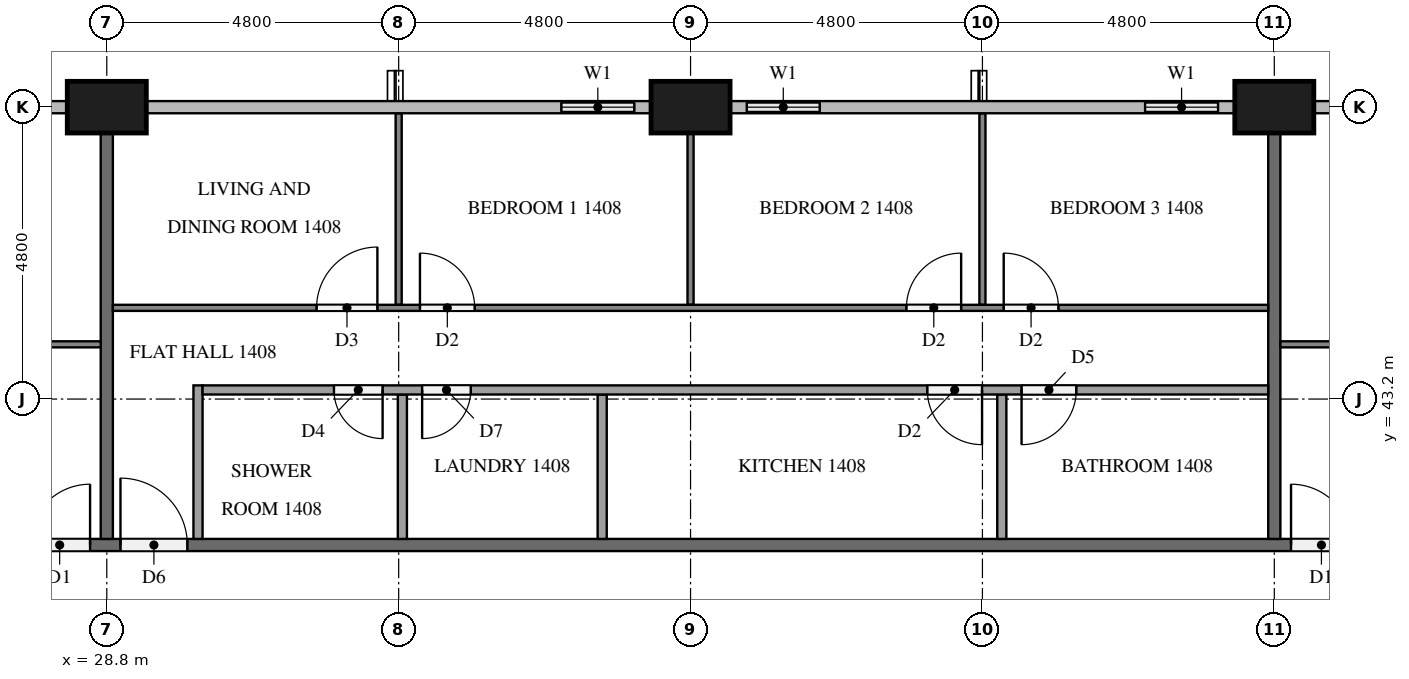
"""IFC4 building model, lengths in metres.
Left out: names, types, materials, properties, quantities, classifications, styles, units other than length and angle.
Written with IfcOpenShell. Run it as: python <this file> out.ifc"""

import sys

from ifc_helpers import new_model, si_unit, direction, frame, frame_2d, origin, origin_2d, place, context, subcontext, project, spatial, rectangle, extrude, element, fill, save


model = new_model("IFC4")
c1 = context("Model", 3, precision=1e-05, world=origin(), true_north=direction((0.0, 1.0)))
c2 = subcontext(c1, "Body", "Model", "MODEL_VIEW")
j1 = project(units=[si_unit("LENGTHUNIT", "METRE"), si_unit("PLANEANGLEUNIT", "RADIAN")], contexts=[c1])
p1 = place(None, origin())
s1 = spatial("IfcSite", under=j1, at=p1, CompositionType="ELEMENT")
p2 = place(p1, origin())
s2 = spatial("IfcBuilding", under=s1, at=p2, CompositionType="ELEMENT")
p3 = place(p2, frame((0.0, 0.0, 59.3)))
s3 = spatial("IfcBuildingStorey", under=s2, at=p3, CompositionType="ELEMENT", Elevation=59.3)
for number, where, z_axis, x_axis in (
    (1, (48.0, 48.0, 0.0), (0.0, 0.0, 1.0), (1.0, 0.0, 0.0)),
    (2, (38.4, 48.0, 0.0), (0.0, 0.0, 1.0), (1.0, 0.0, 0.0)),
    (3, (28.8, 48.0, 0.0), (0.0, 0.0, 1.0), (1.0, 0.0, 0.0)),
):
    element("IfcColumn", number, at=place(p3, frame(where, z_axis=z_axis, x_axis=x_axis)), inside=s3, PredefinedType="COLUMN", context=c2, shape_type="SweptSolid", body=[
        extrude(rectangle(XDim=1.3, YDim=0.85, at=origin_2d()), origin(), (0.0, 0.0, 1.0), 3.2),
    ])
p4 = place(p3, frame((50.4, 48.0, 0.0), z_axis=(0.0, 0.0, 1.0), x_axis=(-1.0, 0.0, 0.0)))
e4 = element("IfcWall", 4, at=p4, inside=s3, PredefinedType="SOLIDWALL", context=c2, shape_type="SweptSolid", body=[
    extrude(rectangle(XDim=1.75, YDim=0.15, at=frame_2d((0.875, 0.0))), origin(), (0.0, 0.0, 1.0), 3.2),
])
p5 = place(p4, frame((0.275, 0.0, 0.9)))
e5 = element("IfcOpeningElement", 5, at=p5, cuts=e4, PredefinedType="OPENING", context=c2, shape_type="SweptSolid", body=[
    extrude(rectangle(XDim=1.2, YDim=1.4, at=frame_2d((0.6, 0.7))), frame((0.0, 0.085, 0.0), z_axis=(0.0, -1.0, 0.0), x_axis=(1.0, 0.0, 0.0)), (0.0, 0.0, 1.0), 0.17),
])
p6 = place(p3, frame((47.35, 48.0, 0.0), z_axis=(0.0, 0.0, 1.0), x_axis=(-1.0, 0.0, 0.0)))
e6 = element("IfcWall", 6, at=p6, inside=s3, PredefinedType="SOLIDWALL", context=c2, shape_type="SweptSolid", body=[
    extrude(rectangle(XDim=1.75, YDim=0.15, at=frame_2d((0.875, 0.0))), origin(), (0.0, 0.0, 1.0), 3.2),
])
p7 = place(p6, frame((0.275, 0.0, 0.9)))
e7 = element("IfcOpeningElement", 7, at=p7, cuts=e6, PredefinedType="OPENING", context=c2, shape_type="SweptSolid", body=[
    extrude(rectangle(XDim=1.2, YDim=1.4, at=frame_2d((0.6, 0.7))), frame((0.0, 0.085, 0.0), z_axis=(0.0, -1.0, 0.0), x_axis=(1.0, 0.0, 0.0)), (0.0, 0.0, 1.0), 0.17),
])
p8 = place(p3, frame((40.8, 48.0, 0.0), z_axis=(0.0, 0.0, 1.0), x_axis=(-1.0, 0.0, 0.0)))
e8 = element("IfcWall", 8, at=p8, inside=s3, PredefinedType="SOLIDWALL", context=c2, shape_type="SweptSolid", body=[
    extrude(rectangle(XDim=1.75, YDim=0.15, at=frame_2d((0.875, 0.0))), origin(), (0.0, 0.0, 1.0), 3.2),
])
p9 = place(p8, frame((0.275, 0.0, 0.9)))
e9 = element("IfcOpeningElement", 9, at=p9, cuts=e8, PredefinedType="OPENING", context=c2, shape_type="SweptSolid", body=[
    extrude(rectangle(XDim=1.2, YDim=1.4, at=frame_2d((0.6, 0.7))), frame((0.0, 0.085, 0.0), z_axis=(0.0, -1.0, 0.0), x_axis=(1.0, 0.0, 0.0)), (0.0, 0.0, 1.0), 0.17),
])
p10 = place(p3, frame((37.75, 48.0, 0.0), z_axis=(0.0, 0.0, 1.0), x_axis=(-1.0, 0.0, 0.0)))
e10 = element("IfcWall", 10, at=p10, inside=s3, PredefinedType="SOLIDWALL", context=c2, shape_type="SweptSolid", body=[
    extrude(rectangle(XDim=1.75, YDim=0.15, at=frame_2d((0.875, 0.0))), origin(), (0.0, 0.0, 1.0), 3.2),
])
p11 = place(p10, frame((0.275, 0.0, 0.9)))
e11 = element("IfcOpeningElement", 11, at=p11, cuts=e10, PredefinedType="OPENING", context=c2, shape_type="SweptSolid", body=[
    extrude(rectangle(XDim=1.2, YDim=1.4, at=frame_2d((0.6, 0.7))), frame((0.0, 0.085, 0.0), z_axis=(0.0, -1.0, 0.0), x_axis=(1.0, 0.0, 0.0)), (0.0, 0.0, 1.0), 0.17),
])
p12 = place(p3, frame((28.15, 48.0, 0.0), z_axis=(0.0, 0.0, 1.0), x_axis=(-1.0, 0.0, 0.0)))
e12 = element("IfcWall", 12, at=p12, inside=s3, PredefinedType="SOLIDWALL", context=c2, shape_type="SweptSolid", body=[
    extrude(rectangle(XDim=1.75, YDim=0.15, at=frame_2d((0.875, 0.0))), origin(), (0.0, 0.0, 1.0), 3.2),
])
p13 = place(p12, frame((0.275, 0.0, 0.9)))
e13 = element("IfcOpeningElement", 13, at=p13, cuts=e12, PredefinedType="OPENING", context=c2, shape_type="SweptSolid", body=[
    extrude(rectangle(XDim=1.2, YDim=1.4, at=frame_2d((0.6, 0.7))), frame((0.0, 0.085, 0.0), z_axis=(0.0, -1.0, 0.0), x_axis=(1.0, 0.0, 0.0)), (0.0, 0.0, 1.0), 0.17),
])
p14 = place(p3, frame((11.9, 40.8, 0.0), z_axis=(0.0, 0.0, 1.0), x_axis=(1.0, 0.0, 0.0)))
e14 = element("IfcWall", 14, at=p14, inside=s3, PredefinedType="PARTITIONING", context=c2, shape_type="SweptSolid", body=[
    extrude(rectangle(XDim=38.6, YDim=0.2, at=frame_2d((19.3, 0.0))), origin(), (0.0, 0.0, 1.0), 3.2),
])
p15 = place(p14, frame((36.375, 0.0, 0.0)))
e15 = element("IfcOpeningElement", 15, at=p15, cuts=e14, PredefinedType="OPENING", context=c2, shape_type="SweptSolid", body=[
    extrude(rectangle(XDim=1.0, YDim=2.1, at=frame_2d((0.5, 1.05))), frame((0.0, 0.11, 0.0), z_axis=(0.0, -1.0, 0.0), x_axis=(1.0, 0.0, 0.0)), (0.0, 0.0, 1.0), 0.22),
])
p16 = place(p14, frame((17.125, 0.0, 0.0)))
e16 = element("IfcOpeningElement", 16, at=p16, cuts=e14, PredefinedType="OPENING", context=c2, shape_type="SweptSolid", body=[
    extrude(rectangle(XDim=1.1, YDim=2.1, at=frame_2d((0.55, 1.05))), frame((0.0, 0.11, 0.0), z_axis=(0.0, -1.0, 0.0), x_axis=(1.0, 0.0, 0.0)), (0.0, 0.0, 1.0), 0.22),
])
p17 = place(p14, frame((15.625, 0.0, 0.0)))
e17 = element("IfcOpeningElement", 17, at=p17, cuts=e14, PredefinedType="OPENING", context=c2, shape_type="SweptSolid", body=[
    extrude(rectangle(XDim=1.0, YDim=2.1, at=frame_2d((0.5, 1.05))), frame((0.0, 0.11, 0.0), z_axis=(0.0, -1.0, 0.0), x_axis=(1.0, 0.0, 0.0)), (0.0, 0.0, 1.0), 0.22),
])
p18 = place(p14, frame((1.225, 0.0, 0.0)))
e18 = element("IfcOpeningElement", 18, at=p18, cuts=e14, PredefinedType="OPENING", context=c2, shape_type="SweptSolid", body=[
    extrude(rectangle(XDim=1.0, YDim=2.1, at=frame_2d((0.5, 1.05))), frame((0.0, 0.11, 0.0), z_axis=(0.0, -1.0, 0.0), x_axis=(1.0, 0.0, 0.0)), (0.0, 0.0, 1.0), 0.22),
])
for number, where, z_axis, x_axis in (
    (19, (48.0, 47.575, 0.0), (0.0, 0.0, 1.0), (0.0, -1.0, 0.0)),
    (20, (28.8, 47.575, 0.0), (0.0, 0.0, 1.0), (0.0, -1.0, 0.0)),
):
    element("IfcWall", number, at=place(p3, frame(where, z_axis=z_axis, x_axis=x_axis)), inside=s3, PredefinedType="PARTITIONING", context=c2, shape_type="SweptSolid", body=[
        extrude(rectangle(XDim=6.675, YDim=0.2, at=frame_2d((3.337, 0.0))), origin(), (0.0, 0.0, 1.0), 3.2),
    ])
p19 = place(p3, frame((48.1, 44.1, 0.0), z_axis=(0.0, 0.0, 1.0), x_axis=(1.0, 0.0, 0.0)))
e21 = element("IfcWall", 21, at=p19, inside=s3, PredefinedType="PARTITIONING", context=c2, shape_type="SweptSolid", body=[
    extrude(rectangle(XDim=13.959, YDim=0.1, at=frame_2d((6.979, 0.0))), origin(), (0.0, 0.0, 1.0), 3.2),
])
p20 = place(p19, frame((3.45, 0.0, 0.0)))
e22 = element("IfcOpeningElement", 22, at=p20, cuts=e21, PredefinedType="OPENING", context=c2, shape_type="SweptSolid", body=[
    extrude(rectangle(XDim=0.9, YDim=2.1, at=frame_2d((0.45, 1.05))), frame((0.0, 0.06, 0.0), z_axis=(0.0, -1.0, 0.0), x_axis=(1.0, 0.0, 0.0)), (0.0, 0.0, 1.0), 0.12),
])
p21 = place(p19, frame((5.05, 0.0, 0.0)))
e23 = element("IfcOpeningElement", 23, at=p21, cuts=e21, PredefinedType="OPENING", context=c2, shape_type="SweptSolid", body=[
    extrude(rectangle(XDim=1.0, YDim=2.1, at=frame_2d((0.5, 1.05))), frame((0.0, 0.06, 0.0), z_axis=(0.0, -1.0, 0.0), x_axis=(1.0, 0.0, 0.0)), (0.0, 0.0, 1.0), 0.12),
])
p22 = place(p19, frame((12.759, 0.0, 0.0)))
e24 = element("IfcOpeningElement", 24, at=p22, cuts=e21, PredefinedType="OPENING", context=c2, shape_type="SweptSolid", body=[
    extrude(rectangle(XDim=0.9, YDim=2.1, at=frame_2d((0.45, 1.05))), frame((0.0, 0.06, 0.0), z_axis=(0.0, -1.0, 0.0), x_axis=(1.0, 0.0, 0.0)), (0.0, 0.0, 1.0), 0.12),
])
p23 = place(p3, frame((33.6, 44.75, 0.0), z_axis=(0.0, 0.0, 1.0), x_axis=(0.0, 1.0, 0.0)))
e25 = element("IfcWall", 25, at=p23, inside=s3, PredefinedType="PARTITIONING", context=c2, shape_type="SweptSolid", body=[
    extrude(rectangle(XDim=3.15, YDim=0.1, at=frame_2d((1.575, 0.0))), origin(), (0.0, 0.0, 1.0), 3.2),
])
p24 = place(p3, frame((38.4, 44.75, 0.0), z_axis=(0.0, 0.0, 1.0), x_axis=(0.0, 1.0, 0.0)))
e26 = element("IfcWall", 26, at=p24, inside=s3, PredefinedType="PARTITIONING", context=c2, shape_type="SweptSolid", body=[
    extrude(rectangle(XDim=2.825, YDim=0.1, at=frame_2d((1.413, 0.0))), origin(), (0.0, 0.0, 1.0), 3.2),
])
p25 = place(p3, frame((43.2, 44.75, 0.0), z_axis=(0.0, 0.0, 1.0), x_axis=(0.0, 1.0, 0.0)))
e27 = element("IfcWall", 27, at=p25, inside=s3, PredefinedType="PARTITIONING", context=c2, shape_type="SweptSolid", body=[
    extrude(rectangle(XDim=3.15, YDim=0.1, at=frame_2d((1.575, 0.0))), origin(), (0.0, 0.0, 1.0), 3.2),
])
p26 = place(p3, frame((28.9, 44.7, 0.0), z_axis=(0.0, 0.0, 1.0), x_axis=(1.0, 0.0, 0.0)))
e28 = element("IfcWall", 28, at=p26, inside=s3, PredefinedType="PARTITIONING", context=c2, shape_type="SweptSolid", body=[
    extrude(rectangle(XDim=19.0, YDim=0.1, at=frame_2d((9.5, 0.0))), origin(), (0.0, 0.0, 1.0), 3.2),
])
p27 = place(p26, frame((3.35, 0.0, 0.0)))
e29 = element("IfcOpeningElement", 29, at=p27, cuts=e28, PredefinedType="OPENING", context=c2, shape_type="SweptSolid", body=[
    extrude(rectangle(XDim=1.0, YDim=2.1, at=frame_2d((0.5, 1.05))), frame((0.0, 0.06, 0.0), z_axis=(0.0, -1.0, 0.0), x_axis=(1.0, 0.0, 0.0)), (0.0, 0.0, 1.0), 0.12),
])
p28 = place(p26, frame((5.05, 0.0, 0.0)))
e30 = element("IfcOpeningElement", 30, at=p28, cuts=e28, PredefinedType="OPENING", context=c2, shape_type="SweptSolid", body=[
    extrude(rectangle(XDim=0.9, YDim=2.1, at=frame_2d((0.45, 1.05))), frame((0.0, 0.06, 0.0), z_axis=(0.0, -1.0, 0.0), x_axis=(1.0, 0.0, 0.0)), (0.0, 0.0, 1.0), 0.12),
])
p29 = place(p26, frame((13.05, 0.0, 0.0)))
e31 = element("IfcOpeningElement", 31, at=p29, cuts=e28, PredefinedType="OPENING", context=c2, shape_type="SweptSolid", body=[
    extrude(rectangle(XDim=0.9, YDim=2.1, at=frame_2d((0.45, 1.05))), frame((0.0, 0.06, 0.0), z_axis=(0.0, -1.0, 0.0), x_axis=(1.0, 0.0, 0.0)), (0.0, 0.0, 1.0), 0.12),
])
p30 = place(p26, frame((14.65, 0.0, 0.0)))
e32 = element("IfcOpeningElement", 32, at=p30, cuts=e28, PredefinedType="OPENING", context=c2, shape_type="SweptSolid", body=[
    extrude(rectangle(XDim=0.9, YDim=2.1, at=frame_2d((0.45, 1.05))), frame((0.0, 0.06, 0.0), z_axis=(0.0, -1.0, 0.0), x_axis=(1.0, 0.0, 0.0)), (0.0, 0.0, 1.0), 0.12),
])
for number, where, z_axis, x_axis in (
    (33, (33.661, 40.9, 0.0), (0.0, 0.0, 1.0), (0.0, 1.0, 0.0)),
    (34, (36.947, 40.9, 0.0), (0.0, 0.0, 1.0), (0.0, 1.0, 0.0)),
    (35, (43.519, 40.9, 0.0), (0.0, 0.0, 1.0), (0.0, 1.0, 0.0)),
):
    element("IfcWall", number, at=place(p3, frame(where, z_axis=z_axis, x_axis=x_axis)), inside=s3, PredefinedType="PARTITIONING", context=c2, shape_type="SweptSolid", body=[
        extrude(rectangle(XDim=2.375, YDim=0.15, at=frame_2d((1.188, 0.0))), origin(), (0.0, 0.0, 1.0), 3.2),
    ])
p31 = place(p3, frame((30.3, 40.9, 0.0), z_axis=(0.0, 0.0, 1.0), x_axis=(0.0, 1.0, 0.0)))
e36 = element("IfcWall", 36, at=p31, inside=s3, PredefinedType="PARTITIONING", context=c2, shape_type="SweptSolid", body=[
    extrude(rectangle(XDim=2.525, YDim=0.15, at=frame_2d((1.263, 0.0))), origin(), (0.0, 0.0, 1.0), 3.2),
])
p32 = place(p3, frame((47.9, 43.35, 0.0), z_axis=(0.0, 0.0, 1.0), x_axis=(-1.0, 0.0, 0.0)))
e37 = element("IfcWall", 37, at=p32, inside=s3, PredefinedType="PARTITIONING", context=c2, shape_type="SweptSolid", body=[
    extrude(rectangle(XDim=17.525, YDim=0.15, at=frame_2d((8.762, 0.0))), origin(), (0.0, 0.0, 1.0), 3.2),
])
p33 = place(p32, frame((14.564, 0.0, 0.0)))
e38 = element("IfcOpeningElement", 38, at=p33, cuts=e37, PredefinedType="OPENING", context=c2, shape_type="SweptSolid", body=[
    extrude(rectangle(XDim=0.8, YDim=2.1, at=frame_2d((0.4, 1.05))), frame((0.0, 0.085, 0.0), z_axis=(0.0, -1.0, 0.0), x_axis=(1.0, 0.0, 0.0)), (0.0, 0.0, 1.0), 0.17),
])
p34 = place(p32, frame((13.114, 0.0, 0.0)))
e39 = element("IfcOpeningElement", 39, at=p34, cuts=e37, PredefinedType="OPENING", context=c2, shape_type="SweptSolid", body=[
    extrude(rectangle(XDim=0.8, YDim=2.1, at=frame_2d((0.4, 1.05))), frame((0.0, 0.085, 0.0), z_axis=(0.0, -1.0, 0.0), x_axis=(1.0, 0.0, 0.0)), (0.0, 0.0, 1.0), 0.17),
])
p35 = place(p32, frame((4.706, 0.0, 0.0)))
e40 = element("IfcOpeningElement", 40, at=p35, cuts=e37, PredefinedType="OPENING", context=c2, shape_type="SweptSolid", body=[
    extrude(rectangle(XDim=0.9, YDim=2.1, at=frame_2d((0.45, 1.05))), frame((0.0, 0.085, 0.0), z_axis=(0.0, -1.0, 0.0), x_axis=(1.0, 0.0, 0.0)), (0.0, 0.0, 1.0), 0.17),
])
p36 = place(p32, frame((3.156, 0.0, 0.0)))
e41 = element("IfcOpeningElement", 41, at=p36, cuts=e37, PredefinedType="OPENING", context=c2, shape_type="SweptSolid", body=[
    extrude(rectangle(XDim=0.9, YDim=2.1, at=frame_2d((0.45, 1.05))), frame((0.0, 0.085, 0.0), z_axis=(0.0, -1.0, 0.0), x_axis=(1.0, 0.0, 0.0)), (0.0, 0.0, 1.0), 0.17),
])
p37 = place(p3, frame((14.5, 44.1, 0.0), z_axis=(0.0, 0.0, 1.0), x_axis=(1.0, 0.0, 0.0)))
e42 = element("IfcWall", 42, at=p37, inside=s3, PredefinedType="PARTITIONING", context=c2, shape_type="SweptSolid", body=[
    extrude(rectangle(XDim=14.2, YDim=0.1, at=frame_2d((7.1, 0.0))), origin(), (0.0, 0.0, 1.0), 3.2),
])
p38 = place(p37, frame((9.85, 0.0, 0.0)))
e43 = element("IfcOpeningElement", 43, at=p38, cuts=e42, PredefinedType="OPENING", context=c2, shape_type="SweptSolid", body=[
    extrude(rectangle(XDim=0.9, YDim=2.1, at=frame_2d((0.45, 1.05))), frame((0.0, 0.06, 0.0), z_axis=(0.0, -1.0, 0.0), x_axis=(1.0, 0.0, 0.0)), (0.0, 0.0, 1.0), 0.12),
])
p39 = place(p37, frame((8.25, 0.0, 0.0)))
e44 = element("IfcOpeningElement", 44, at=p39, cuts=e42, PredefinedType="OPENING", context=c2, shape_type="SweptSolid", body=[
    extrude(rectangle(XDim=0.9, YDim=2.1, at=frame_2d((0.45, 1.05))), frame((0.0, 0.06, 0.0), z_axis=(0.0, -1.0, 0.0), x_axis=(1.0, 0.0, 0.0)), (0.0, 0.0, 1.0), 0.12),
])
p40 = place(p37, frame((0.3, 0.0, 0.0)))
e45 = element("IfcOpeningElement", 45, at=p40, cuts=e42, PredefinedType="OPENING", context=c2, shape_type="SweptSolid", body=[
    extrude(rectangle(XDim=1.0, YDim=2.1, at=frame_2d((0.5, 1.05))), frame((0.0, 0.06, 0.0), z_axis=(0.0, -1.0, 0.0), x_axis=(1.0, 0.0, 0.0)), (0.0, 0.0, 1.0), 0.12),
])
p41 = place(p7, origin())
e46 = element("IfcWindow", 46, at=p41, inside=s3, PartitioningType="SINGLE_PANEL", PredefinedType="WINDOW", context=c2, shape_type="SweptSolid", body=[
    extrude(rectangle(XDim=1.2, YDim=1.4, at=frame_2d((0.6, 0.7))), frame((0.0, 0.03, 0.0), z_axis=(0.0, -1.0, 0.0), x_axis=(1.0, 0.0, 0.0)), (0.0, 0.0, 1.0), 0.06),
])
fill(e7, e46)
p42 = place(p9, origin())
e47 = element("IfcWindow", 47, at=p42, inside=s3, PartitioningType="SINGLE_PANEL", PredefinedType="WINDOW", context=c2, shape_type="SweptSolid", body=[
    extrude(rectangle(XDim=1.2, YDim=1.4, at=frame_2d((0.6, 0.7))), frame((0.0, 0.03, 0.0), z_axis=(0.0, -1.0, 0.0), x_axis=(1.0, 0.0, 0.0)), (0.0, 0.0, 1.0), 0.06),
])
fill(e9, e47)
p43 = place(p11, origin())
e48 = element("IfcWindow", 48, at=p43, inside=s3, PartitioningType="SINGLE_PANEL", PredefinedType="WINDOW", context=c2, shape_type="SweptSolid", body=[
    extrude(rectangle(XDim=1.2, YDim=1.4, at=frame_2d((0.6, 0.7))), frame((0.0, 0.03, 0.0), z_axis=(0.0, -1.0, 0.0), x_axis=(1.0, 0.0, 0.0)), (0.0, 0.0, 1.0), 0.06),
])
fill(e11, e48)
p44 = place(p15, origin())
e49 = element("IfcDoor", 49, at=p44, inside=s3, OperationType="SINGLE_SWING_LEFT", PredefinedType="DOOR", context=c2, shape_type="SweptSolid", body=[
    extrude(rectangle(XDim=1.0, YDim=2.1, at=frame_2d((0.5, 1.05))), frame((0.0, 0.025, 0.0), z_axis=(0.0, -1.0, 0.0), x_axis=(1.0, 0.0, 0.0)), (0.0, 0.0, 1.0), 0.05),
])
fill(e15, e49)
p45 = place(p16, origin())
e50 = element("IfcDoor", 50, at=p45, inside=s3, OperationType="SINGLE_SWING_LEFT", PredefinedType="DOOR", context=c2, shape_type="SweptSolid", body=[
    extrude(rectangle(XDim=1.1, YDim=2.1, at=frame_2d((0.55, 1.05))), frame((0.0, 0.025, 0.0), z_axis=(0.0, -1.0, 0.0), x_axis=(1.0, 0.0, 0.0)), (0.0, 0.0, 1.0), 0.05),
])
fill(e16, e50)
p46 = place(p17, origin())
e51 = element("IfcDoor", 51, at=p46, inside=s3, OperationType="SINGLE_SWING_RIGHT", PredefinedType="DOOR", context=c2, shape_type="SweptSolid", body=[
    extrude(rectangle(XDim=1.0, YDim=2.1, at=frame_2d((0.5, 1.05))), frame((0.0, 0.025, 0.0), z_axis=(0.0, -1.0, 0.0), x_axis=(1.0, 0.0, 0.0)), (0.0, 0.0, 1.0), 0.05),
])
fill(e17, e51)
p47 = place(p27, origin())
e52 = element("IfcDoor", 52, at=p47, inside=s3, OperationType="SINGLE_SWING_RIGHT", PredefinedType="DOOR", context=c2, shape_type="SweptSolid", body=[
    extrude(rectangle(XDim=1.0, YDim=2.1, at=frame_2d((0.5, 1.05))), frame((0.0, 0.025, 0.0), z_axis=(0.0, -1.0, 0.0), x_axis=(1.0, 0.0, 0.0)), (0.0, 0.0, 1.0), 0.05),
])
fill(e29, e52)
p48 = place(p28, origin())
e53 = element("IfcDoor", 53, at=p48, inside=s3, OperationType="SINGLE_SWING_LEFT", PredefinedType="DOOR", context=c2, shape_type="SweptSolid", body=[
    extrude(rectangle(XDim=0.9, YDim=2.1, at=frame_2d((0.45, 1.05))), frame((0.0, 0.025, 0.0), z_axis=(0.0, -1.0, 0.0), x_axis=(1.0, 0.0, 0.0)), (0.0, 0.0, 1.0), 0.05),
])
fill(e30, e53)
p49 = place(p29, origin())
e54 = element("IfcDoor", 54, at=p49, inside=s3, OperationType="SINGLE_SWING_RIGHT", PredefinedType="DOOR", context=c2, shape_type="SweptSolid", body=[
    extrude(rectangle(XDim=0.9, YDim=2.1, at=frame_2d((0.45, 1.05))), frame((0.0, 0.025, 0.0), z_axis=(0.0, -1.0, 0.0), x_axis=(1.0, 0.0, 0.0)), (0.0, 0.0, 1.0), 0.05),
])
fill(e31, e54)
p50 = place(p30, origin())
e55 = element("IfcDoor", 55, at=p50, inside=s3, OperationType="SINGLE_SWING_LEFT", PredefinedType="DOOR", context=c2, shape_type="SweptSolid", body=[
    extrude(rectangle(XDim=0.9, YDim=2.1, at=frame_2d((0.45, 1.05))), frame((0.0, 0.025, 0.0), z_axis=(0.0, -1.0, 0.0), x_axis=(1.0, 0.0, 0.0)), (0.0, 0.0, 1.0), 0.05),
])
fill(e32, e55)
p51 = place(p33, origin())
e56 = element("IfcDoor", 56, at=p51, inside=s3, OperationType="SINGLE_SWING_LEFT", PredefinedType="DOOR", context=c2, shape_type="SweptSolid", body=[
    extrude(rectangle(XDim=0.8, YDim=2.1, at=frame_2d((0.4, 1.05))), frame((0.0, 0.025, 0.0), z_axis=(0.0, -1.0, 0.0), x_axis=(1.0, 0.0, 0.0)), (0.0, 0.0, 1.0), 0.05),
])
fill(e38, e56)
p52 = place(p34, origin())
e57 = element("IfcDoor", 57, at=p52, inside=s3, OperationType="SINGLE_SWING_RIGHT", PredefinedType="DOOR", context=c2, shape_type="SweptSolid", body=[
    extrude(rectangle(XDim=0.8, YDim=2.1, at=frame_2d((0.4, 1.05))), frame((0.0, 0.025, 0.0), z_axis=(0.0, -1.0, 0.0), x_axis=(1.0, 0.0, 0.0)), (0.0, 0.0, 1.0), 0.05),
])
fill(e39, e57)
p53 = place(p35, origin())
e58 = element("IfcDoor", 58, at=p53, inside=s3, OperationType="SINGLE_SWING_LEFT", PredefinedType="DOOR", context=c2, shape_type="SweptSolid", body=[
    extrude(rectangle(XDim=0.9, YDim=2.1, at=frame_2d((0.45, 1.05))), frame((0.0, 0.025, 0.0), z_axis=(0.0, -1.0, 0.0), x_axis=(1.0, 0.0, 0.0)), (0.0, 0.0, 1.0), 0.05),
])
fill(e40, e58)
p54 = place(p36, origin())
e59 = element("IfcDoor", 59, at=p54, inside=s3, OperationType="SINGLE_SWING_RIGHT", PredefinedType="DOOR", context=c2, shape_type="SweptSolid", body=[
    extrude(rectangle(XDim=0.9, YDim=2.1, at=frame_2d((0.45, 1.05))), frame((0.0, 0.025, 0.0), z_axis=(0.0, -1.0, 0.0), x_axis=(1.0, 0.0, 0.0)), (0.0, 0.0, 1.0), 0.05),
])
fill(e41, e59)
save(model, sys.argv[1])
